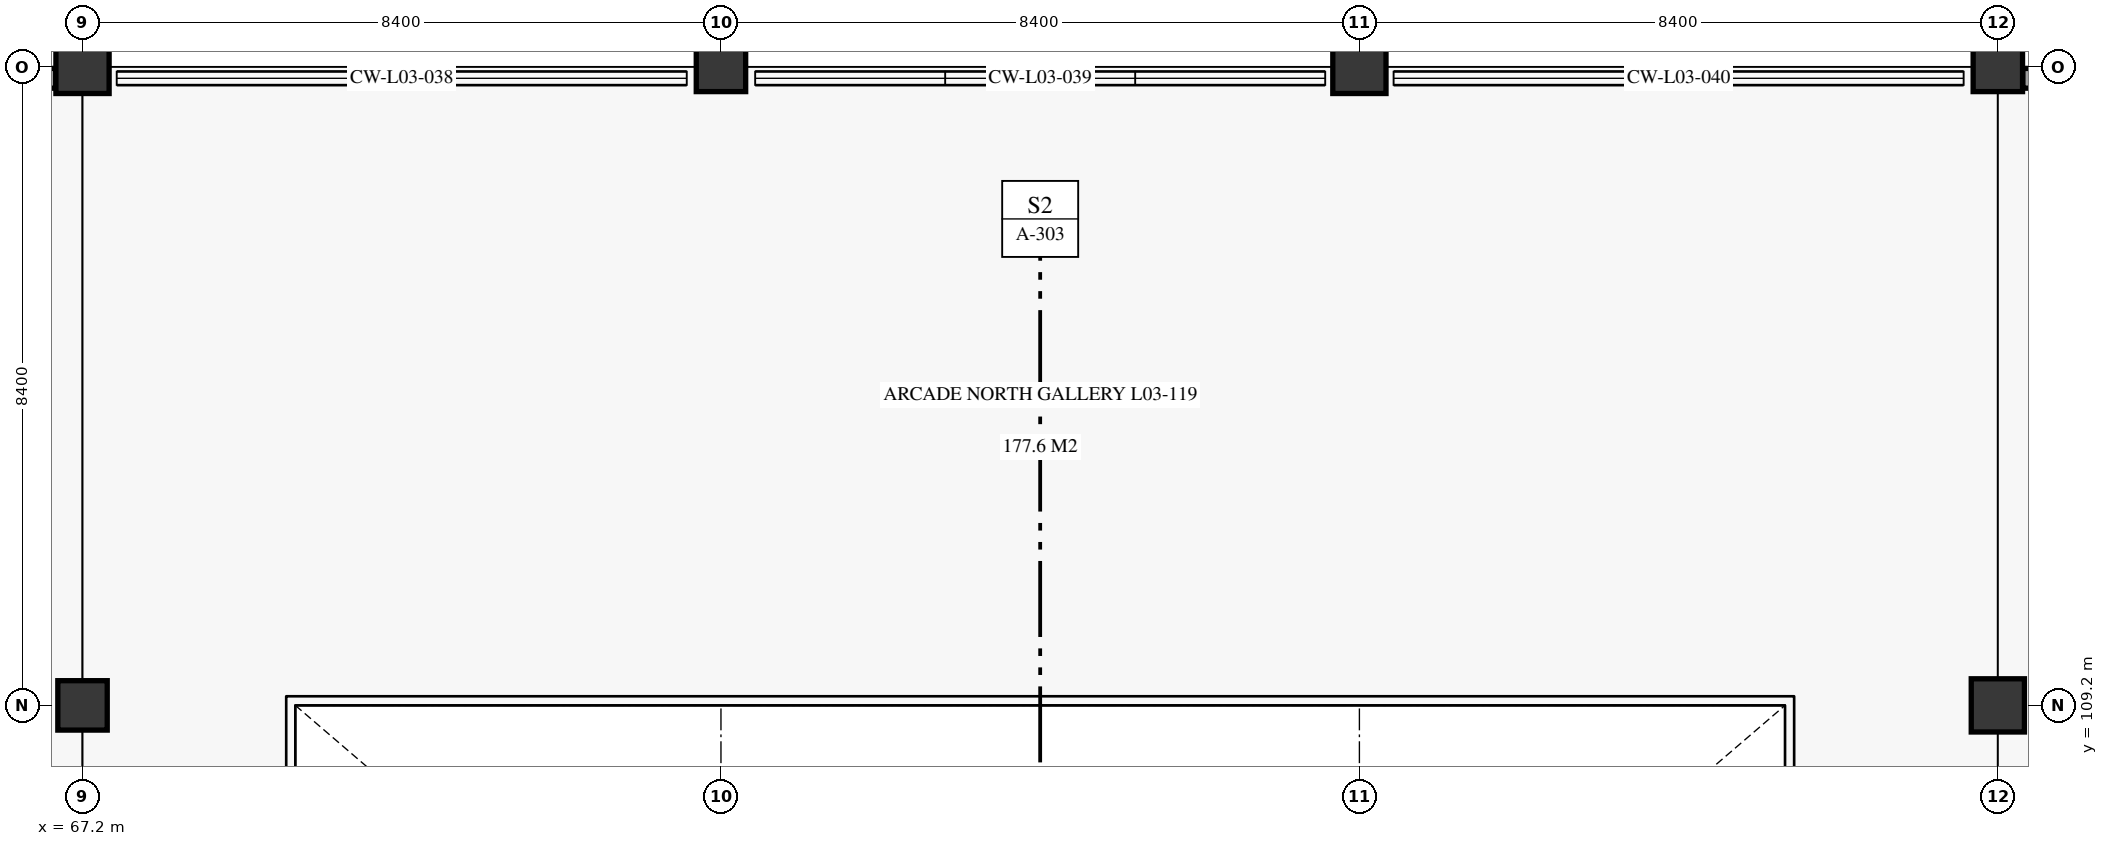
"""IFC4 building model, lengths in metres.
Left out: names, types, materials, properties, quantities, classifications, styles, units other than length and angle.
Written with IfcOpenShell. Run it as: python <this file> out.ifc"""

import sys

from ifc_helpers import new_model, si_unit, direction, frame, frame_2d, origin, origin_2d, place, context, subcontext, project, spatial, rectangle, extrude, element, save


model = new_model("IFC4")
c1 = context("Model", 3, precision=1e-05, world=origin(), true_north=direction((0.0, 1.0)))
c2 = subcontext(c1, "Body", "Model", "MODEL_VIEW")
j1 = project(units=[si_unit("LENGTHUNIT", "METRE"), si_unit("PLANEANGLEUNIT", "RADIAN")], contexts=[c1])
p1 = place(None, origin())
s1 = spatial("IfcSite", under=j1, at=p1, CompositionType="ELEMENT")
p2 = place(p1, origin())
s2 = spatial("IfcBuilding", under=s1, at=p2, CompositionType="ELEMENT")
p3 = place(p2, frame((0.0, 0.0, 11.4)))
s3 = spatial("IfcBuildingStorey", under=s2, at=p3, CompositionType="ELEMENT", Elevation=11.4)
p4 = place(p3, frame((67.2, 109.2, 0.0), z_axis=(0.0, 0.0, 1.0), x_axis=(1.0, 0.0, 0.0)))
e1 = element("IfcColumn", 1, at=p4, inside=s3, PredefinedType="COLUMN", context=c2, shape_type="SweptSolid", body=[
    extrude(rectangle(XDim=0.65, YDim=0.65, at=origin_2d()), origin(), (0.0, 0.0, 1.0), 5.1),
])
p5 = place(p3, frame((67.2, 117.6, 0.0), z_axis=(0.0, 0.0, 1.0), x_axis=(1.0, 0.0, 0.0)))
e2 = element("IfcColumn", 2, at=p5, inside=s3, PredefinedType="COLUMN", context=c2, shape_type="SweptSolid", body=[
    extrude(rectangle(XDim=0.7, YDim=0.7, at=origin_2d()), origin(), (0.0, 0.0, 1.0), 5.1),
])
p6 = place(p3, frame((75.6, 117.6, 0.0), z_axis=(0.0, 0.0, 1.0), x_axis=(1.0, 0.0, 0.0)))
e3 = element("IfcColumn", 3, at=p6, inside=s3, PredefinedType="COLUMN", context=c2, shape_type="SweptSolid", body=[
    extrude(rectangle(XDim=0.65, YDim=0.65, at=origin_2d()), origin(), (0.0, 0.0, 1.0), 5.1),
])
for number, where, z_axis, x_axis in (
    (4, (84.0, 117.6, 0.0), (0.0, 0.0, 1.0), (1.0, 0.0, 0.0)),
    (5, (92.4, 109.2, 0.0), (0.0, 0.0, 1.0), (1.0, 0.0, 0.0)),
):
    element("IfcColumn", number, at=place(p3, frame(where, z_axis=z_axis, x_axis=x_axis)), inside=s3, PredefinedType="COLUMN", context=c2, shape_type="SweptSolid", body=[
        extrude(rectangle(XDim=0.7, YDim=0.7, at=origin_2d()), origin(), (0.0, 0.0, 1.0), 5.1),
    ])
p7 = place(p3, frame((92.4, 117.6, 0.0), z_axis=(0.0, 0.0, 1.0), x_axis=(1.0, 0.0, 0.0)))
e6 = element("IfcColumn", 6, at=p7, inside=s3, PredefinedType="COLUMN", context=c2, shape_type="SweptSolid", body=[
    extrude(rectangle(XDim=0.65, YDim=0.65, at=origin_2d()), origin(), (0.0, 0.0, 1.0), 5.1),
])
p8 = place(p3, frame((59.128, 117.45, 0.0), z_axis=(0.0, 0.0, 1.0), x_axis=(1.0, 0.0, 0.0)))
e7 = element("IfcWall", 7, at=p8, inside=s3, PredefinedType="SOLIDWALL", context=c2, shape_type="SweptSolid", body=[
    extrude(rectangle(XDim=7.72, YDim=0.26, at=frame_2d((3.86, 0.0))), origin(), (0.0, 0.0, 1.0), 4.38),
])
p9 = place(p8, frame((2.572, 0.0, 0.95)))
e8 = element("IfcOpeningElement", 8, at=p9, cuts=e7, PredefinedType="OPENING", context=c2, shape_type="SweptSolid", body=[
    extrude(rectangle(XDim=2.6, YDim=2.1, at=frame_2d((1.3, 1.05))), frame((0.0, 0.14, 0.0), z_axis=(0.0, -1.0, 0.0), x_axis=(1.0, 0.0, 0.0)), (0.0, 0.0, 1.0), 0.28),
])
p10 = place(p3, frame((92.728, 117.45, 0.0), z_axis=(0.0, 0.0, 1.0), x_axis=(1.0, 0.0, 0.0)))
e9 = element("IfcWall", 9, at=p10, inside=s3, PredefinedType="SOLIDWALL", context=c2, shape_type="SweptSolid", body=[
    extrude(rectangle(XDim=7.72, YDim=0.26, at=frame_2d((3.86, 0.0))), origin(), (0.0, 0.0, 1.0), 4.38),
])
p11 = place(p10, frame((2.272, 0.0, 0.95)))
e10 = element("IfcOpeningElement", 10, at=p11, cuts=e9, PredefinedType="OPENING", context=c2, shape_type="SweptSolid", body=[
    extrude(rectangle(XDim=3.2, YDim=2.15, at=frame_2d((1.6, 1.075))), frame((0.0, 0.14, 0.0), z_axis=(0.0, -1.0, 0.0), x_axis=(1.0, 0.0, 0.0)), (0.0, 0.0, 1.0), 0.28),
])
save(model, sys.argv[1])
